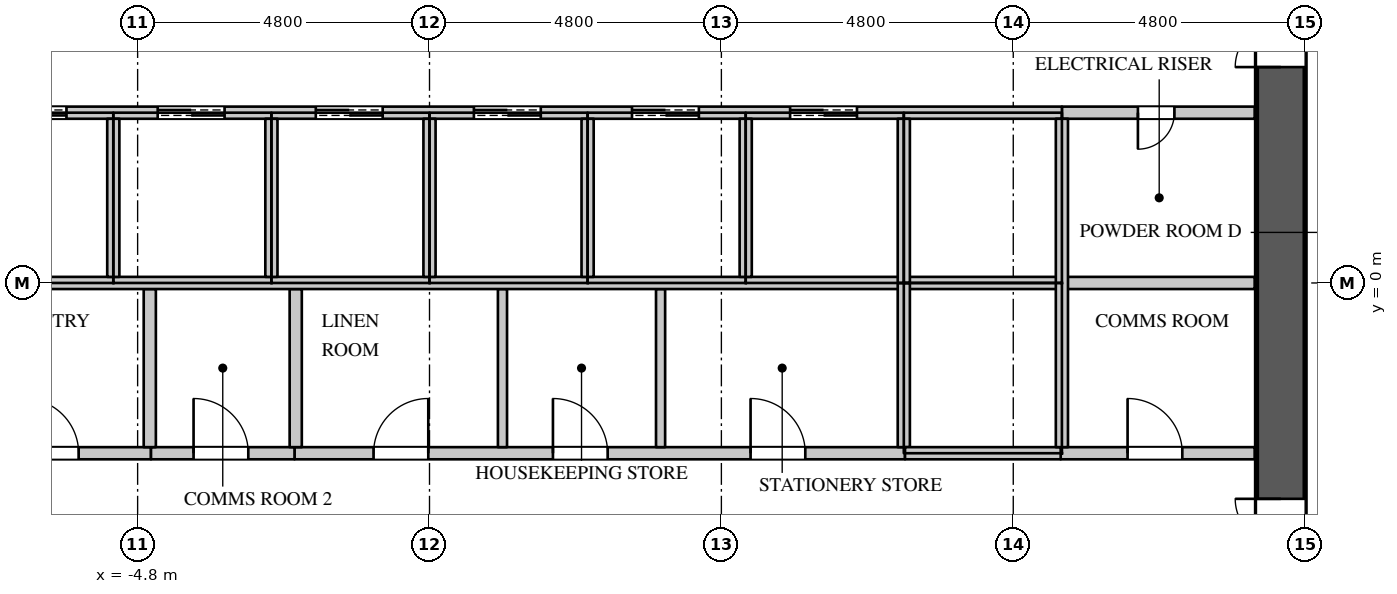
"""IFC4 building model, lengths in metres.
Left out: names, types, materials, properties, quantities, classifications, styles, units other than length and angle.
Written with IfcOpenShell. Run it as: python <this file> out.ifc"""

import sys

from ifc_helpers import new_model, si_unit, direction, frame, frame_2d, origin, place, context, subcontext, project, spatial, rectangle, extrude, element, fill, save


model = new_model("IFC4")
c1 = context("Model", 3, precision=1e-05, world=origin(), true_north=direction((0.0, 1.0)))
c2 = subcontext(c1, "Body", "Model", "MODEL_VIEW")
j1 = project(units=[si_unit("LENGTHUNIT", "METRE"), si_unit("PLANEANGLEUNIT", "RADIAN")], contexts=[c1])
p1 = place(None, origin())
s1 = spatial("IfcSite", under=j1, at=p1, CompositionType="ELEMENT")
p2 = place(p1, origin())
s2 = spatial("IfcBuilding", under=s1, at=p2, CompositionType="ELEMENT")
p3 = place(p2, frame((0.0, 0.0, 110.7)))
s3 = spatial("IfcBuildingStorey", under=s2, at=p3, CompositionType="ELEMENT", Elevation=110.7)
p4 = place(p3, frame((14.0, -11.2, 0.0), z_axis=(0.0, 0.0, 1.0), x_axis=(0.0, 1.0, 0.0)))
e1 = element("IfcWall", 1, at=p4, inside=s3, PredefinedType="SHEAR", context=c2, shape_type="SweptSolid", body=[
    extrude(rectangle(XDim=22.4, YDim=0.8, at=frame_2d((11.2, 0.0))), origin(), (0.0, 0.0, 1.0), 4.2),
])
p5 = place(p4, frame((20.25, 0.0, 0.0)))
e2 = element("IfcOpeningElement", 2, at=p5, cuts=e1, PredefinedType="OPENING", context=c2, shape_type="SweptSolid", body=[
    extrude(rectangle(XDim=1.1, YDim=2.2, at=frame_2d((0.55, 1.1))), frame((0.0, 0.41, 0.0), z_axis=(0.0, -1.0, 0.0), x_axis=(1.0, 0.0, 0.0)), (0.0, 0.0, 1.0), 0.82),
])
p6 = place(p4, frame((1.05, 0.0, 0.0)))
e3 = element("IfcOpeningElement", 3, at=p6, cuts=e1, PredefinedType="OPENING", context=c2, shape_type="SweptSolid", body=[
    extrude(rectangle(XDim=1.1, YDim=2.2, at=frame_2d((0.55, 1.1))), frame((0.0, 0.41, 0.0), z_axis=(0.0, -1.0, 0.0), x_axis=(1.0, 0.0, 0.0)), (0.0, 0.0, 1.0), 0.82),
])
p7 = place(p4, frame((14.75, 0.0, 0.0)))
e4 = element("IfcOpeningElement", 4, at=p7, cuts=e1, PredefinedType="OPENING", context=c2, shape_type="SweptSolid", body=[
    extrude(rectangle(XDim=1.5, YDim=2.4, at=frame_2d((0.75, 1.2))), frame((0.0, 0.41, 0.0), z_axis=(0.0, -1.0, 0.0), x_axis=(1.0, 0.0, 0.0)), (0.0, 0.0, 1.0), 0.82),
])
p8 = place(p4, frame((6.15, 0.0, 0.0)))
e5 = element("IfcOpeningElement", 5, at=p8, cuts=e1, PredefinedType="OPENING", context=c2, shape_type="SweptSolid", body=[
    extrude(rectangle(XDim=1.5, YDim=2.4, at=frame_2d((0.75, 1.2))), frame((0.0, 0.41, 0.0), z_axis=(0.0, -1.0, 0.0), x_axis=(1.0, 0.0, 0.0)), (0.0, 0.0, 1.0), 0.82),
])
p9 = place(p3, frame((-7.82, -2.8, 0.0), z_axis=(0.0, 0.0, 1.0), x_axis=(1.0, 0.0, 0.0)))
e6 = element("IfcWall", 6, at=p9, inside=s3, PredefinedType="PARTITIONING", context=c2, shape_type="SweptSolid", body=[
    extrude(rectangle(XDim=3.24, YDim=0.2, at=frame_2d((1.62, 0.0))), origin(), (0.0, 0.0, 1.0), 3.95),
])
p10 = place(p9, frame((1.15, 0.0, 0.0)))
e7 = element("IfcOpeningElement", 7, at=p10, cuts=e6, PredefinedType="OPENING", context=c2, shape_type="SweptSolid", body=[
    extrude(rectangle(XDim=0.9, YDim=2.2, at=frame_2d((0.45, 1.1))), frame((0.0, 0.11, 0.0), z_axis=(0.0, -1.0, 0.0), x_axis=(1.0, 0.0, 0.0)), (0.0, 0.0, 1.0), 0.22),
])
p11 = place(p3, frame((-2.22, -2.8, 0.0), z_axis=(0.0, 0.0, 1.0), x_axis=(1.0, 0.0, 0.0)))
e8 = element("IfcWall", 8, at=p11, inside=s3, PredefinedType="PARTITIONING", context=c2, shape_type="SweptSolid", body=[
    extrude(rectangle(XDim=10.04, YDim=0.2, at=frame_2d((5.02, 0.0))), origin(), (0.0, 0.0, 1.0), 3.95),
])
p12 = place(p11, frame((1.3, 0.0, 0.0)))
e9 = element("IfcOpeningElement", 9, at=p12, cuts=e8, PredefinedType="OPENING", context=c2, shape_type="SweptSolid", body=[
    extrude(rectangle(XDim=0.9, YDim=2.2, at=frame_2d((0.45, 1.1))), frame((0.0, 0.11, 0.0), z_axis=(0.0, -1.0, 0.0), x_axis=(1.0, 0.0, 0.0)), (0.0, 0.0, 1.0), 0.22),
])
p13 = place(p11, frame((4.25, 0.0, 0.0)))
e10 = element("IfcOpeningElement", 10, at=p13, cuts=e8, PredefinedType="OPENING", context=c2, shape_type="SweptSolid", body=[
    extrude(rectangle(XDim=0.9, YDim=2.2, at=frame_2d((0.45, 1.1))), frame((0.0, 0.11, 0.0), z_axis=(0.0, -1.0, 0.0), x_axis=(1.0, 0.0, 0.0)), (0.0, 0.0, 1.0), 0.22),
])
p14 = place(p11, frame((7.5, 0.0, 0.0)))
e11 = element("IfcOpeningElement", 11, at=p14, cuts=e8, PredefinedType="OPENING", context=c2, shape_type="SweptSolid", body=[
    extrude(rectangle(XDim=0.9, YDim=2.2, at=frame_2d((0.45, 1.1))), frame((0.0, 0.11, 0.0), z_axis=(0.0, -1.0, 0.0), x_axis=(1.0, 0.0, 0.0)), (0.0, 0.0, 1.0), 0.22),
])
for number, where, z_axis, x_axis in (
    (12, (1.2, -2.7, 0.0), (0.0, 0.0, 1.0), (0.0, 1.0, 0.0)),
    (13, (3.8, -2.7, 0.0), (0.0, 0.0, 1.0), (0.0, 1.0, 0.0)),
):
    element("IfcWall", number, at=place(p3, frame(where, z_axis=z_axis, x_axis=x_axis)), inside=s3, PredefinedType="PARTITIONING", context=c2, shape_type="SweptSolid", body=[
        extrude(rectangle(XDim=2.6, YDim=0.15, at=frame_2d((1.3, 0.0))), origin(), (0.0, 0.0, 1.0), 3.95),
    ])
p15 = place(p3, frame((-4.58, -2.8, 0.0), z_axis=(0.0, 0.0, 1.0), x_axis=(1.0, 0.0, 0.0)))
e14 = element("IfcWall", 14, at=p15, inside=s3, PredefinedType="PARTITIONING", context=c2, shape_type="SweptSolid", body=[
    extrude(rectangle(XDim=2.36, YDim=0.2, at=frame_2d((1.18, 0.0))), origin(), (0.0, 0.0, 1.0), 3.95),
])
p16 = place(p15, frame((0.7, 0.0, 0.0)))
e15 = element("IfcOpeningElement", 15, at=p16, cuts=e14, PredefinedType="OPENING", context=c2, shape_type="SweptSolid", body=[
    extrude(rectangle(XDim=0.9, YDim=2.2, at=frame_2d((0.45, 1.1))), frame((0.0, 0.11, 0.0), z_axis=(0.0, -1.0, 0.0), x_axis=(1.0, 0.0, 0.0)), (0.0, 0.0, 1.0), 0.22),
])
for number, where, z_axis, x_axis in (
    (16, (-4.6, -2.7, 0.0), (0.0, 0.0, 1.0), (0.0, 1.0, 0.0)),
    (17, (-2.2, -2.7, 0.0), (0.0, 0.0, 1.0), (0.0, 1.0, 0.0)),
):
    element("IfcWall", number, at=place(p3, frame(where, z_axis=z_axis, x_axis=x_axis)), inside=s3, PredefinedType="PARTITIONING", context=c2, shape_type="SweptSolid", body=[
        extrude(rectangle(XDim=2.6, YDim=0.2, at=frame_2d((1.3, 0.0))), origin(), (0.0, 0.0, 1.0), 3.95),
    ])
p17 = place(p3, frame((10.38, -2.8, 0.0), z_axis=(0.0, 0.0, 1.0), x_axis=(1.0, 0.0, 0.0)))
e18 = element("IfcWall", 18, at=p17, inside=s3, PredefinedType="PARTITIONING", context=c2, shape_type="SweptSolid", body=[
    extrude(rectangle(XDim=3.19, YDim=0.2, at=frame_2d((1.595, 0.0))), origin(), (0.0, 0.0, 1.0), 3.95),
])
p18 = place(p17, frame((1.1, 0.0, 0.0)))
e19 = element("IfcOpeningElement", 19, at=p18, cuts=e18, PredefinedType="OPENING", context=c2, shape_type="SweptSolid", body=[
    extrude(rectangle(XDim=0.9, YDim=2.2, at=frame_2d((0.45, 1.1))), frame((0.0, 0.11, 0.0), z_axis=(0.0, -1.0, 0.0), x_axis=(1.0, 0.0, 0.0)), (0.0, 0.0, 1.0), 0.22),
])
p19 = place(p3, frame((10.4, 2.8, 0.0), z_axis=(0.0, 0.0, 1.0), x_axis=(1.0, 0.0, 0.0)))
e20 = element("IfcWall", 20, at=p19, inside=s3, PredefinedType="PARTITIONING", context=c2, shape_type="SweptSolid", body=[
    extrude(rectangle(XDim=3.17, YDim=0.2, at=frame_2d((1.585, 0.0))), origin(), (0.0, 0.0, 1.0), 3.95),
])
p20 = place(p19, frame((1.25, 0.0, 0.0)))
e21 = element("IfcOpeningElement", 21, at=p20, cuts=e20, PredefinedType="OPENING", context=c2, shape_type="SweptSolid", body=[
    extrude(rectangle(XDim=0.6, YDim=2.0, at=frame_2d((0.3, 1.0))), frame((0.0, 0.11, 0.0), z_axis=(0.0, -1.0, 0.0), x_axis=(1.0, 0.0, 0.0)), (0.0, 0.0, 1.0), 0.22),
])
p21 = place(p3, frame((10.4, 0.0, 0.0), z_axis=(0.0, 0.0, 1.0), x_axis=(1.0, 0.0, 0.0)))
e22 = element("IfcWall", 22, at=p21, inside=s3, PredefinedType="PARTITIONING", context=c2, shape_type="SweptSolid", body=[
    extrude(rectangle(XDim=3.17, YDim=0.2, at=frame_2d((1.585, 0.0))), origin(), (0.0, 0.0, 1.0), 3.95),
])
p22 = place(p3, frame((-13.57, 0.0, 0.0), z_axis=(0.0, 0.0, 1.0), x_axis=(1.0, 0.0, 0.0)))
e23 = element("IfcWall", 23, at=p22, inside=s3, PredefinedType="PARTITIONING", context=c2, shape_type="SweptSolid", body=[
    extrude(rectangle(XDim=23.97, YDim=0.2, at=frame_2d((11.985, 0.0))), origin(), (0.0, 0.0, 1.0), 3.95),
])
p23 = place(p3, frame((-13.57, 2.8, 0.0), z_axis=(0.0, 0.0, 1.0), x_axis=(1.0, 0.0, 0.0)))
e24 = element("IfcWall", 24, at=p23, inside=s3, PredefinedType="PARTITIONING", context=c2, shape_type="SweptSolid", body=[
    extrude(rectangle(XDim=23.97, YDim=0.2, at=frame_2d((11.985, 0.0))), origin(), (0.0, 0.0, 1.0), 3.95),
])
p24 = place(p23, frame((1.0, 0.0, 0.0)))
e25 = element("IfcOpeningElement", 25, at=p24, cuts=e24, PredefinedType="OPENING", context=c2, shape_type="SweptSolid", body=[
    extrude(rectangle(XDim=1.1, YDim=2.2, at=frame_2d((0.55, 1.1))), frame((0.0, 0.11, 0.0), z_axis=(0.0, -1.0, 0.0), x_axis=(1.0, 0.0, 0.0)), (0.0, 0.0, 1.0), 0.22),
])
p25 = place(p23, frame((3.9, 0.0, 0.0)))
e26 = element("IfcOpeningElement", 26, at=p25, cuts=e24, PredefinedType="OPENING", context=c2, shape_type="SweptSolid", body=[
    extrude(rectangle(XDim=1.1, YDim=2.2, at=frame_2d((0.55, 1.1))), frame((0.0, 0.11, 0.0), z_axis=(0.0, -1.0, 0.0), x_axis=(1.0, 0.0, 0.0)), (0.0, 0.0, 1.0), 0.22),
])
p26 = place(p23, frame((6.5, 0.0, 0.0)))
e27 = element("IfcOpeningElement", 27, at=p26, cuts=e24, PredefinedType="OPENING", context=c2, shape_type="SweptSolid", body=[
    extrude(rectangle(XDim=1.1, YDim=2.2, at=frame_2d((0.55, 1.1))), frame((0.0, 0.11, 0.0), z_axis=(0.0, -1.0, 0.0), x_axis=(1.0, 0.0, 0.0)), (0.0, 0.0, 1.0), 0.22),
])
p27 = place(p23, frame((9.1, 0.0, 0.0)))
e28 = element("IfcOpeningElement", 28, at=p27, cuts=e24, PredefinedType="OPENING", context=c2, shape_type="SweptSolid", body=[
    extrude(rectangle(XDim=1.1, YDim=2.2, at=frame_2d((0.55, 1.1))), frame((0.0, 0.11, 0.0), z_axis=(0.0, -1.0, 0.0), x_axis=(1.0, 0.0, 0.0)), (0.0, 0.0, 1.0), 0.22),
])
p28 = place(p23, frame((11.7, 0.0, 0.0)))
e29 = element("IfcOpeningElement", 29, at=p28, cuts=e24, PredefinedType="OPENING", context=c2, shape_type="SweptSolid", body=[
    extrude(rectangle(XDim=1.1, YDim=2.2, at=frame_2d((0.55, 1.1))), frame((0.0, 0.11, 0.0), z_axis=(0.0, -1.0, 0.0), x_axis=(1.0, 0.0, 0.0)), (0.0, 0.0, 1.0), 0.22),
])
p29 = place(p23, frame((14.3, 0.0, 0.0)))
e30 = element("IfcOpeningElement", 30, at=p29, cuts=e24, PredefinedType="OPENING", context=c2, shape_type="SweptSolid", body=[
    extrude(rectangle(XDim=1.1, YDim=2.2, at=frame_2d((0.55, 1.1))), frame((0.0, 0.11, 0.0), z_axis=(0.0, -1.0, 0.0), x_axis=(1.0, 0.0, 0.0)), (0.0, 0.0, 1.0), 0.22),
])
p30 = place(p23, frame((16.9, 0.0, 0.0)))
e31 = element("IfcOpeningElement", 31, at=p30, cuts=e24, PredefinedType="OPENING", context=c2, shape_type="SweptSolid", body=[
    extrude(rectangle(XDim=1.1, YDim=2.2, at=frame_2d((0.55, 1.1))), frame((0.0, 0.11, 0.0), z_axis=(0.0, -1.0, 0.0), x_axis=(1.0, 0.0, 0.0)), (0.0, 0.0, 1.0), 0.22),
])
p31 = place(p23, frame((19.5, 0.0, 0.0)))
e32 = element("IfcOpeningElement", 32, at=p31, cuts=e24, PredefinedType="OPENING", context=c2, shape_type="SweptSolid", body=[
    extrude(rectangle(XDim=1.1, YDim=2.2, at=frame_2d((0.55, 1.1))), frame((0.0, 0.11, 0.0), z_axis=(0.0, -1.0, 0.0), x_axis=(1.0, 0.0, 0.0)), (0.0, 0.0, 1.0), 0.22),
])
for number, where, z_axis, x_axis in (
    (33, (-5.2, 0.1, 0.0), (0.0, 0.0, 1.0), (0.0, 1.0, 0.0)),
    (34, (-2.6, 0.1, 0.0), (0.0, 0.0, 1.0), (0.0, 1.0, 0.0)),
    (35, (0.0, 0.1, 0.0), (0.0, 0.0, 1.0), (0.0, 1.0, 0.0)),
    (36, (2.6, 0.1, 0.0), (0.0, 0.0, 1.0), (0.0, 1.0, 0.0)),
    (37, (5.2, 0.1, 0.0), (0.0, 0.0, 1.0), (0.0, 1.0, 0.0)),
):
    element("IfcWall", number, at=place(p3, frame(where, z_axis=z_axis, x_axis=x_axis)), inside=s3, PredefinedType="PARTITIONING", context=c2, shape_type="SweptSolid", body=[
        extrude(rectangle(XDim=2.6, YDim=0.2, at=frame_2d((1.3, 0.0))), origin(), (0.0, 0.0, 1.0), 3.95),
    ])
p32 = place(p3, frame((7.8, -2.7, 0.0), z_axis=(0.0, 0.0, 1.0), x_axis=(0.0, 1.0, 0.0)))
e38 = element("IfcWall", 38, at=p32, inside=s3, PredefinedType="PARTITIONING", context=c2, shape_type="SweptSolid", body=[
    extrude(rectangle(XDim=2.7, YDim=0.2, at=frame_2d((1.35, 0.0))), origin(), (0.0, 0.0, 1.0), 3.95),
])
p33 = place(p3, frame((7.82, -2.8, 0.0), z_axis=(0.0, 0.0, 1.0), x_axis=(1.0, 0.0, 0.0)))
e39 = element("IfcWall", 39, at=p33, inside=s3, PredefinedType="PARTITIONING", context=c2, shape_type="SweptSolid", body=[
    extrude(rectangle(XDim=2.56, YDim=0.2, at=frame_2d((1.28, 0.0))), origin(), (0.0, 0.0, 1.0), 3.95),
])
p34 = place(p3, frame((7.8, 0.0, 0.0), z_axis=(0.0, 0.0, 1.0), x_axis=(0.0, 1.0, 0.0)))
e40 = element("IfcWall", 40, at=p34, inside=s3, PredefinedType="PARTITIONING", context=c2, shape_type="SweptSolid", body=[
    extrude(rectangle(XDim=2.7, YDim=0.2, at=frame_2d((1.35, 0.0))), origin(), (0.0, 0.0, 1.0), 3.95),
])
p35 = place(p3, frame((10.4, -2.7, 0.0), z_axis=(0.0, 0.0, 1.0), x_axis=(0.0, 1.0, 0.0)))
e41 = element("IfcWall", 41, at=p35, inside=s3, PredefinedType="PARTITIONING", context=c2, shape_type="SweptSolid", body=[
    extrude(rectangle(XDim=5.4, YDim=0.2, at=frame_2d((2.7, 0.0))), origin(), (0.0, 0.0, 1.0), 3.95),
])
p36 = place(p20, origin())
e42 = element("IfcDoor", 42, at=p36, inside=s3, OperationType="SINGLE_SWING_RIGHT", PredefinedType="DOOR", context=c2, shape_type="SweptSolid", body=[
    extrude(rectangle(XDim=0.6, YDim=2.0, at=frame_2d((0.3, 1.0))), frame((0.0, 0.025, 0.0), z_axis=(0.0, -1.0, 0.0), x_axis=(1.0, 0.0, 0.0)), (0.0, 0.0, 1.0), 0.05),
])
fill(e21, e42)
p37 = place(p18, origin())
e43 = element("IfcDoor", 43, at=p37, inside=s3, OperationType="SINGLE_SWING_LEFT", PredefinedType="DOOR", context=c2, shape_type="SweptSolid", body=[
    extrude(rectangle(XDim=0.9, YDim=2.2, at=frame_2d((0.45, 1.1))), frame((0.0, 0.025, 0.0), z_axis=(0.0, -1.0, 0.0), x_axis=(1.0, 0.0, 0.0)), (0.0, 0.0, 1.0), 0.05),
])
fill(e19, e43)
p38 = place(p10, origin())
e44 = element("IfcDoor", 44, at=p38, inside=s3, OperationType="SINGLE_SWING_LEFT", PredefinedType="DOOR", context=c2, shape_type="SweptSolid", body=[
    extrude(rectangle(XDim=0.9, YDim=2.2, at=frame_2d((0.45, 1.1))), frame((0.0, 0.025, 0.0), z_axis=(0.0, -1.0, 0.0), x_axis=(1.0, 0.0, 0.0)), (0.0, 0.0, 1.0), 0.05),
])
fill(e7, e44)
p39 = place(p16, origin())
e45 = element("IfcDoor", 45, at=p39, inside=s3, OperationType="SINGLE_SWING_LEFT", PredefinedType="DOOR", context=c2, shape_type="SweptSolid", body=[
    extrude(rectangle(XDim=0.9, YDim=2.2, at=frame_2d((0.45, 1.1))), frame((0.0, 0.025, 0.0), z_axis=(0.0, -1.0, 0.0), x_axis=(1.0, 0.0, 0.0)), (0.0, 0.0, 1.0), 0.05),
])
fill(e15, e45)
p40 = place(p12, origin())
e46 = element("IfcDoor", 46, at=p40, inside=s3, OperationType="SINGLE_SWING_RIGHT", PredefinedType="DOOR", context=c2, shape_type="SweptSolid", body=[
    extrude(rectangle(XDim=0.9, YDim=2.2, at=frame_2d((0.45, 1.1))), frame((0.0, 0.025, 0.0), z_axis=(0.0, -1.0, 0.0), x_axis=(1.0, 0.0, 0.0)), (0.0, 0.0, 1.0), 0.05),
])
fill(e9, e46)
p41 = place(p13, origin())
e47 = element("IfcDoor", 47, at=p41, inside=s3, OperationType="SINGLE_SWING_LEFT", PredefinedType="DOOR", context=c2, shape_type="SweptSolid", body=[
    extrude(rectangle(XDim=0.9, YDim=2.2, at=frame_2d((0.45, 1.1))), frame((0.0, 0.025, 0.0), z_axis=(0.0, -1.0, 0.0), x_axis=(1.0, 0.0, 0.0)), (0.0, 0.0, 1.0), 0.05),
])
fill(e10, e47)
p42 = place(p14, origin())
e48 = element("IfcDoor", 48, at=p42, inside=s3, OperationType="SINGLE_SWING_LEFT", PredefinedType="DOOR", context=c2, shape_type="SweptSolid", body=[
    extrude(rectangle(XDim=0.9, YDim=2.2, at=frame_2d((0.45, 1.1))), frame((0.0, 0.025, 0.0), z_axis=(0.0, -1.0, 0.0), x_axis=(1.0, 0.0, 0.0)), (0.0, 0.0, 1.0), 0.05),
])
fill(e11, e48)
p43 = place(p26, origin())
e49 = element("IfcDoor", 49, at=p43, inside=s3, OperationType="DOUBLE_DOOR_SLIDING", PredefinedType="DOOR", context=c2, shape_type="SweptSolid", body=[
    extrude(rectangle(XDim=1.1, YDim=2.2, at=frame_2d((0.55, 1.1))), frame((0.0, 0.025, 0.0), z_axis=(0.0, -1.0, 0.0), x_axis=(1.0, 0.0, 0.0)), (0.0, 0.0, 1.0), 0.05),
])
fill(e27, e49)
p44 = place(p27, origin())
e50 = element("IfcDoor", 50, at=p44, inside=s3, OperationType="DOUBLE_DOOR_SLIDING", PredefinedType="DOOR", context=c2, shape_type="SweptSolid", body=[
    extrude(rectangle(XDim=1.1, YDim=2.2, at=frame_2d((0.55, 1.1))), frame((0.0, 0.025, 0.0), z_axis=(0.0, -1.0, 0.0), x_axis=(1.0, 0.0, 0.0)), (0.0, 0.0, 1.0), 0.05),
])
fill(e28, e50)
p45 = place(p28, origin())
e51 = element("IfcDoor", 51, at=p45, inside=s3, OperationType="DOUBLE_DOOR_SLIDING", PredefinedType="DOOR", context=c2, shape_type="SweptSolid", body=[
    extrude(rectangle(XDim=1.1, YDim=2.2, at=frame_2d((0.55, 1.1))), frame((0.0, 0.025, 0.0), z_axis=(0.0, -1.0, 0.0), x_axis=(1.0, 0.0, 0.0)), (0.0, 0.0, 1.0), 0.05),
])
fill(e29, e51)
p46 = place(p29, origin())
e52 = element("IfcDoor", 52, at=p46, inside=s3, OperationType="DOUBLE_DOOR_SLIDING", PredefinedType="DOOR", context=c2, shape_type="SweptSolid", body=[
    extrude(rectangle(XDim=1.1, YDim=2.2, at=frame_2d((0.55, 1.1))), frame((0.0, 0.025, 0.0), z_axis=(0.0, -1.0, 0.0), x_axis=(1.0, 0.0, 0.0)), (0.0, 0.0, 1.0), 0.05),
])
fill(e30, e52)
p47 = place(p30, origin())
e53 = element("IfcDoor", 53, at=p47, inside=s3, OperationType="DOUBLE_DOOR_SLIDING", PredefinedType="DOOR", context=c2, shape_type="SweptSolid", body=[
    extrude(rectangle(XDim=1.1, YDim=2.2, at=frame_2d((0.55, 1.1))), frame((0.0, 0.025, 0.0), z_axis=(0.0, -1.0, 0.0), x_axis=(1.0, 0.0, 0.0)), (0.0, 0.0, 1.0), 0.05),
])
fill(e31, e53)
p48 = place(p31, origin())
e54 = element("IfcDoor", 54, at=p48, inside=s3, OperationType="DOUBLE_DOOR_SLIDING", PredefinedType="DOOR", context=c2, shape_type="SweptSolid", body=[
    extrude(rectangle(XDim=1.1, YDim=2.2, at=frame_2d((0.55, 1.1))), frame((0.0, 0.025, 0.0), z_axis=(0.0, -1.0, 0.0), x_axis=(1.0, 0.0, 0.0)), (0.0, 0.0, 1.0), 0.05),
])
fill(e32, e54)
p49 = place(p7, origin())
e55 = element("IfcDoor", 55, at=p49, inside=s3, OperationType="DOUBLE_DOOR_SINGLE_SWING", PredefinedType="DOOR", context=c2, shape_type="SweptSolid", body=[
    extrude(rectangle(XDim=1.5, YDim=2.4, at=frame_2d((0.75, 1.2))), frame((0.0, 0.395, 0.0), z_axis=(0.0, -1.0, 0.0), x_axis=(1.0, 0.0, 0.0)), (0.0, 0.0, 1.0), 0.05),
])
fill(e4, e55)
p50 = place(p8, origin())
e56 = element("IfcDoor", 56, at=p50, inside=s3, OperationType="DOUBLE_DOOR_SINGLE_SWING", PredefinedType="DOOR", context=c2, shape_type="SweptSolid", body=[
    extrude(rectangle(XDim=1.5, YDim=2.4, at=frame_2d((0.75, 1.2))), frame((0.0, 0.395, 0.0), z_axis=(0.0, -1.0, 0.0), x_axis=(1.0, 0.0, 0.0)), (0.0, 0.0, 1.0), 0.05),
])
fill(e5, e56)
save(model, sys.argv[1])
